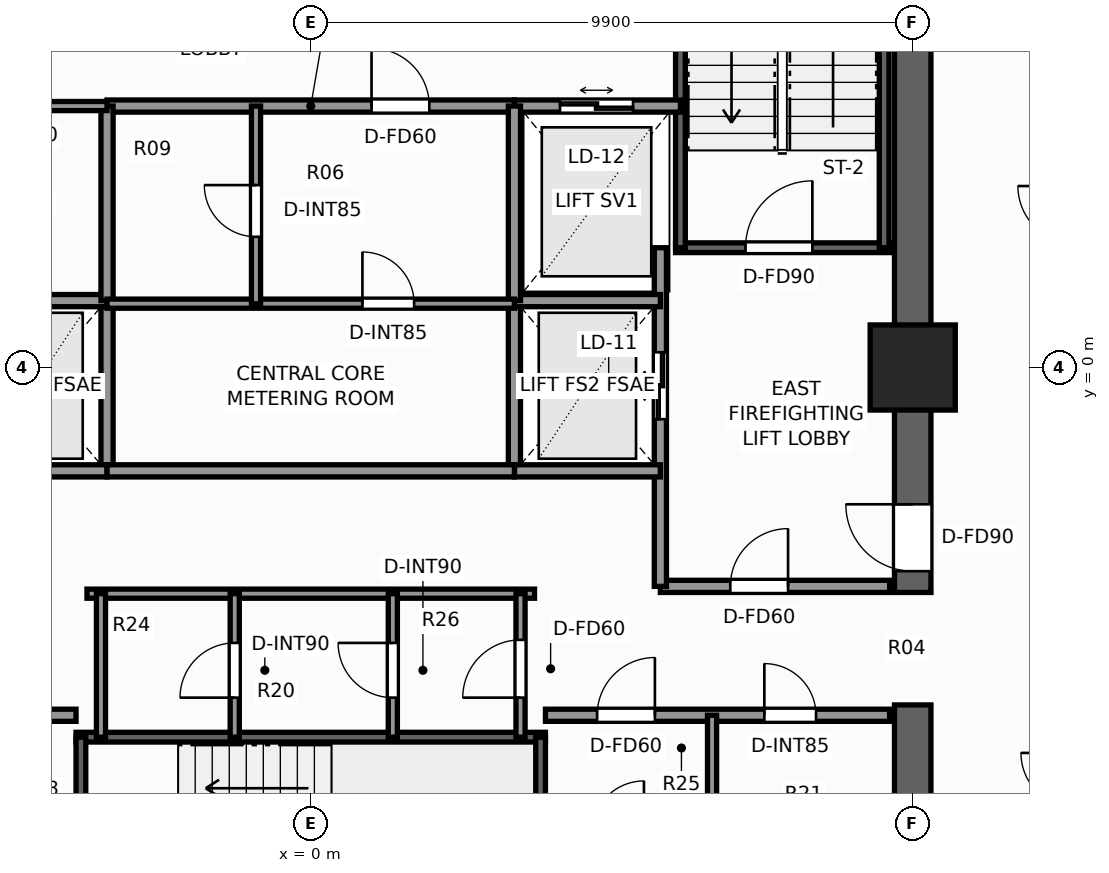
"""IFC4 building model, lengths in metres.
Left out: names, types, materials, properties, quantities, classifications, styles, units other than length and angle.
Written with IfcOpenShell. Run it as: python <this file> out.ifc"""

import sys

from ifc_helpers import new_model, si_unit, direction, frame, frame_2d, origin, origin_2d, place, context, subcontext, project, spatial, rectangle, extrude, element, fill, save


model = new_model("IFC4")
c1 = context("Model", 3, precision=1e-05, world=origin(), true_north=direction((0.0, 1.0)))
c2 = subcontext(c1, "Body", "Model", "MODEL_VIEW")
j1 = project(units=[si_unit("LENGTHUNIT", "METRE"), si_unit("PLANEANGLEUNIT", "RADIAN")], contexts=[c1])
p1 = place(None, origin())
s1 = spatial("IfcSite", under=j1, at=p1, CompositionType="ELEMENT")
p2 = place(p1, origin())
s2 = spatial("IfcBuilding", under=s1, at=p2, CompositionType="ELEMENT")
p3 = place(p2, frame((0.0, 0.0, 50.2)))
s3 = spatial("IfcBuildingStorey", under=s2, at=p3, CompositionType="ELEMENT", Elevation=50.2)
p4 = place(p3, frame((9.9, -9.6, 0.0), z_axis=(0.0, 0.0, 1.0), x_axis=(0.0, 1.0, 0.0)))
e1 = element("IfcWall", 1, at=p4, inside=s3, PredefinedType="SHEAR", context=c2, shape_type="SweptSolid", body=[
    extrude(rectangle(XDim=4.05, YDim=0.6, at=frame_2d((2.025, 0.0))), origin(), (0.0, 0.0, 1.0), 3.3),
])
p5 = place(p3, frame((9.9, -3.7, 0.0), z_axis=(0.0, 0.0, 1.0), x_axis=(0.0, 1.0, 0.0)))
e2 = element("IfcWall", 2, at=p5, inside=s3, PredefinedType="SHEAR", context=c2, shape_type="SweptSolid", body=[
    extrude(rectangle(XDim=13.3, YDim=0.6, at=frame_2d((6.65, 0.0))), origin(), (0.0, 0.0, 1.0), 3.3),
])
p6 = place(p5, frame((0.35, 0.0, 0.0)))
e3 = element("IfcOpeningElement", 3, at=p6, cuts=e2, PredefinedType="OPENING", context=c2, shape_type="SweptSolid", body=[
    extrude(rectangle(XDim=1.1, YDim=2.2, at=frame_2d((0.55, 1.1))), frame((0.0, 0.31, 0.0), z_axis=(0.0, -1.0, 0.0), x_axis=(1.0, 0.0, 0.0)), (0.0, 0.0, 1.0), 0.62),
])
p7 = place(p3, frame((9.9, 0.0, 0.0), z_axis=(0.0, 0.0, 1.0), x_axis=(1.0, 0.0, 0.0)))
e4 = element("IfcColumn", 4, at=p7, inside=s3, PredefinedType="COLUMN", context=c2, shape_type="SweptSolid", body=[
    extrude(rectangle(XDim=1.4, YDim=1.4, at=origin_2d()), origin(), (0.0, 0.0, 1.0), 3.3),
])
p8 = place(p3, frame((6.0, 1.97, 0.0), z_axis=(0.0, 0.0, 1.0), x_axis=(1.0, 0.0, 0.0)))
e5 = element("IfcWall", 5, at=p8, inside=s3, PredefinedType="SHEAR", context=c2, shape_type="SweptSolid", body=[
    extrude(rectangle(XDim=3.52, YDim=0.16, at=frame_2d((1.76, 0.0))), origin(), (0.0, 0.0, 1.0), 3.3),
])
p9 = place(p8, frame((1.15, 0.0, 0.0)))
e6 = element("IfcOpeningElement", 6, at=p9, cuts=e5, PredefinedType="OPENING", context=c2, shape_type="SweptSolid", body=[
    extrude(rectangle(XDim=1.1, YDim=2.2, at=frame_2d((0.55, 1.1))), frame((0.0, 0.09, 0.0), z_axis=(0.0, -1.0, 0.0), x_axis=(1.0, 0.0, 0.0)), (0.0, 0.0, 1.0), 0.18),
])
for number, where, z_axis, x_axis in (
    (7, (6.08, 1.97, 0.0), (0.0, 0.0, 1.0), (0.0, 1.0, 0.0)),
    (8, (9.43, 1.97, 0.0), (0.0, 0.0, 1.0), (0.0, 1.0, 0.0)),
):
    element("IfcWall", number, at=place(p3, frame(where, z_axis=z_axis, x_axis=x_axis)), inside=s3, PredefinedType="SHEAR", context=c2, shape_type="SweptSolid", body=[
        extrude(rectangle(XDim=7.56, YDim=0.16, at=frame_2d((3.78, 0.0))), origin(), (0.0, 0.0, 1.0), 3.3),
    ])
p10 = place(p3, frame((-3.86, -6.08, 0.0), z_axis=(0.0, 0.0, 1.0), x_axis=(1.0, 0.0, 0.0)))
e9 = element("IfcWall", 9, at=p10, inside=s3, PredefinedType="SHEAR", context=c2, shape_type="SweptSolid", body=[
    extrude(rectangle(XDim=7.72, YDim=0.16, at=frame_2d((3.86, 0.0))), origin(), (0.0, 0.0, 1.0), 3.3),
])
for number, where, z_axis, x_axis in (
    (10, (-3.78, -9.43, 0.0), (0.0, 0.0, 1.0), (0.0, 1.0, 0.0)),
    (11, (3.78, -9.43, 0.0), (0.0, 0.0, 1.0), (0.0, 1.0, 0.0)),
):
    element("IfcWall", number, at=place(p3, frame(where, z_axis=z_axis, x_axis=x_axis)), inside=s3, PredefinedType="SHEAR", context=c2, shape_type="SweptSolid", body=[
        extrude(rectangle(XDim=3.35, YDim=0.16, at=frame_2d((1.675, 0.0))), origin(), (0.0, 0.0, 1.0), 3.3),
    ])
p11 = place(p3, frame((-3.35, -1.7, 0.0), z_axis=(0.0, 0.0, 1.0), x_axis=(0.0, 1.0, 0.0)))
e12 = element("IfcWall", 12, at=p11, inside=s3, PredefinedType="SOLIDWALL", context=c2, shape_type="SweptSolid", body=[
    extrude(rectangle(XDim=2.8, YDim=0.2, at=frame_2d((1.4, 0.0))), origin(), (0.0, 0.0, 1.0), 3.06),
])
for number, where, z_axis, x_axis in (
    (13, (-5.75, -1.7, 0.0), (0.0, 0.0, 1.0), (1.0, 0.0, 0.0)),
    (14, (-5.75, 1.1, 0.0), (0.0, 0.0, 1.0), (1.0, 0.0, 0.0)),
):
    element("IfcWall", number, at=place(p3, frame(where, z_axis=z_axis, x_axis=x_axis)), inside=s3, PredefinedType="SOLIDWALL", context=c2, shape_type="SweptSolid", body=[
        extrude(rectangle(XDim=2.4, YDim=0.2, at=frame_2d((1.2, 0.0))), origin(), (0.0, 0.0, 1.0), 3.06),
    ])
p12 = place(p3, frame((5.75, -3.6, 0.0), z_axis=(0.0, 0.0, 1.0), x_axis=(1.0, 0.0, 0.0)))
e15 = element("IfcWall", 15, at=p12, inside=s3, PredefinedType="SOLIDWALL", context=c2, shape_type="SweptSolid", body=[
    extrude(rectangle(XDim=3.77, YDim=0.2, at=frame_2d((1.885, 0.0))), origin(), (0.0, 0.0, 1.0), 3.06),
])
p13 = place(p12, frame((1.15, 0.0, 0.0)))
e16 = element("IfcOpeningElement", 16, at=p13, cuts=e15, PredefinedType="OPENING", context=c2, shape_type="SweptSolid", body=[
    extrude(rectangle(XDim=0.95, YDim=2.06, at=frame_2d((0.475, 1.03))), frame((0.0, 0.11, 0.0), z_axis=(0.0, -1.0, 0.0), x_axis=(1.0, 0.0, 0.0)), (0.0, 0.0, 1.0), 0.22),
])
p14 = place(p3, frame((5.75, -3.6, 0.0), z_axis=(0.0, 0.0, 1.0), x_axis=(0.0, 1.0, 0.0)))
e17 = element("IfcWall", 17, at=p14, inside=s3, PredefinedType="SOLIDWALL", context=c2, shape_type="SweptSolid", body=[
    extrude(rectangle(XDim=5.57, YDim=0.2, at=frame_2d((2.785, 0.0))), origin(), (0.0, 0.0, 1.0), 3.06),
])
p15 = place(p14, frame((2.75, 0.0, 0.0)))
e18 = element("IfcOpeningElement", 18, at=p15, cuts=e17, PredefinedType="OPENING", context=c2, shape_type="SweptSolid", body=[
    extrude(rectangle(XDim=1.1, YDim=2.2, at=frame_2d((0.55, 1.1))), frame((0.0, 0.11, 0.0), z_axis=(0.0, -1.0, 0.0), x_axis=(1.0, 0.0, 0.0)), (0.0, 0.0, 1.0), 0.22),
])
p16 = place(p3, frame((3.35, -1.7, 0.0), z_axis=(0.0, 0.0, 1.0), x_axis=(0.0, 1.0, 0.0)))
e19 = element("IfcWall", 19, at=p16, inside=s3, PredefinedType="SOLIDWALL", context=c2, shape_type="SweptSolid", body=[
    extrude(rectangle(XDim=2.8, YDim=0.2, at=frame_2d((1.4, 0.0))), origin(), (0.0, 0.0, 1.0), 3.06),
])
for number, where, z_axis, x_axis in (
    (20, (3.35, -1.7, 0.0), (0.0, 0.0, 1.0), (1.0, 0.0, 0.0)),
    (21, (3.35, 1.1, 0.0), (0.0, 0.0, 1.0), (1.0, 0.0, 0.0)),
):
    element("IfcWall", number, at=place(p3, frame(where, z_axis=z_axis, x_axis=x_axis)), inside=s3, PredefinedType="SOLIDWALL", context=c2, shape_type="SweptSolid", body=[
        extrude(rectangle(XDim=2.4, YDim=0.2, at=frame_2d((1.2, 0.0))), origin(), (0.0, 0.0, 1.0), 3.06),
    ])
p17 = place(p3, frame((3.35, 4.3, 0.0), z_axis=(0.0, 0.0, 1.0), x_axis=(1.0, 0.0, 0.0)))
e22 = element("IfcWall", 22, at=p17, inside=s3, PredefinedType="SOLIDWALL", context=c2, shape_type="SweptSolid", body=[
    extrude(rectangle(XDim=2.73, YDim=0.2, at=frame_2d((1.365, 0.0))), origin(), (0.0, 0.0, 1.0), 3.06),
])
p18 = place(p17, frame((0.75, 0.0, 0.0)))
e23 = element("IfcOpeningElement", 23, at=p18, cuts=e22, PredefinedType="OPENING", context=c2, shape_type="SweptSolid", body=[
    extrude(rectangle(XDim=1.2, YDim=2.25, at=frame_2d((0.6, 1.125))), frame((0.0, 0.11, 0.0), z_axis=(0.0, -1.0, 0.0), x_axis=(1.0, 0.0, 0.0)), (0.0, 0.0, 1.0), 0.22),
])
p19 = place(p3, frame((-9.52, -5.72, 0.0), z_axis=(0.0, 0.0, 1.0), x_axis=(1.0, 0.0, 0.0)))
e24 = element("IfcWall", 24, at=p19, inside=s3, PredefinedType="SOLIDWALL", context=c2, shape_type="SweptSolid", body=[
    extrude(rectangle(XDim=5.66, YDim=0.2, at=frame_2d((2.83, 0.0))), origin(), (0.0, 0.0, 1.0), 3.06),
])
p20 = place(p19, frame((3.6, 0.0, 0.0)))
e25 = element("IfcOpeningElement", 25, at=p20, cuts=e24, PredefinedType="OPENING", context=c2, shape_type="SweptSolid", body=[
    extrude(rectangle(XDim=0.95, YDim=2.06, at=frame_2d((0.475, 1.03))), frame((0.0, 0.11, 0.0), z_axis=(0.0, -1.0, 0.0), x_axis=(1.0, 0.0, 0.0)), (0.0, 0.0, 1.0), 0.22),
])
p21 = place(p19, frame((0.85, 0.0, 0.0)))
e26 = element("IfcOpeningElement", 26, at=p21, cuts=e24, PredefinedType="OPENING", context=c2, shape_type="SweptSolid", body=[
    extrude(rectangle(XDim=0.85, YDim=2.03, at=frame_2d((0.425, 1.015))), frame((0.0, 0.11, 0.0), z_axis=(0.0, -1.0, 0.0), x_axis=(1.0, 0.0, 0.0)), (0.0, 0.0, 1.0), 0.22),
])
p22 = place(p3, frame((3.86, -5.72, 0.0), z_axis=(0.0, 0.0, 1.0), x_axis=(1.0, 0.0, 0.0)))
e27 = element("IfcWall", 27, at=p22, inside=s3, PredefinedType="SOLIDWALL", context=c2, shape_type="SweptSolid", body=[
    extrude(rectangle(XDim=5.66, YDim=0.2, at=frame_2d((2.83, 0.0))), origin(), (0.0, 0.0, 1.0), 3.06),
])
p23 = place(p22, frame((0.85, 0.0, 0.0)))
e28 = element("IfcOpeningElement", 28, at=p23, cuts=e27, PredefinedType="OPENING", context=c2, shape_type="SweptSolid", body=[
    extrude(rectangle(XDim=0.95, YDim=2.06, at=frame_2d((0.475, 1.03))), frame((0.0, 0.11, 0.0), z_axis=(0.0, -1.0, 0.0), x_axis=(1.0, 0.0, 0.0)), (0.0, 0.0, 1.0), 0.22),
])
p24 = place(p22, frame((3.6, 0.0, 0.0)))
e29 = element("IfcOpeningElement", 29, at=p24, cuts=e27, PredefinedType="OPENING", context=c2, shape_type="SweptSolid", body=[
    extrude(rectangle(XDim=0.85, YDim=2.03, at=frame_2d((0.425, 1.015))), frame((0.0, 0.11, 0.0), z_axis=(0.0, -1.0, 0.0), x_axis=(1.0, 0.0, 0.0)), (0.0, 0.0, 1.0), 0.22),
])
p25 = place(p3, frame((6.6, -7.65, 0.0), z_axis=(0.0, 0.0, 1.0), x_axis=(0.0, 1.0, 0.0)))
e30 = element("IfcWall", 30, at=p25, inside=s3, PredefinedType="PARTITIONING", context=c2, shape_type="SweptSolid", body=[
    extrude(rectangle(XDim=1.93, YDim=0.15, at=frame_2d((0.965, 0.0))), origin(), (0.0, 0.0, 1.0), 3.06),
])
p26 = place(p3, frame((-3.35, 4.3, 0.0), z_axis=(0.0, 0.0, 1.0), x_axis=(1.0, 0.0, 0.0)))
e31 = element("IfcWall", 31, at=p26, inside=s3, PredefinedType="SOLIDWALL", context=c2, shape_type="SweptSolid", body=[
    extrude(rectangle(XDim=6.7, YDim=0.2, at=frame_2d((3.35, 0.0))), origin(), (0.0, 0.0, 1.0), 3.06),
])
p27 = place(p26, frame((4.35, 0.0, 0.0)))
e32 = element("IfcOpeningElement", 32, at=p27, cuts=e31, PredefinedType="OPENING", context=c2, shape_type="SweptSolid", body=[
    extrude(rectangle(XDim=0.95, YDim=2.06, at=frame_2d((0.475, 1.03))), frame((0.0, 0.11, 0.0), z_axis=(0.0, -1.0, 0.0), x_axis=(1.0, 0.0, 0.0)), (0.0, 0.0, 1.0), 0.22),
])
p28 = place(p3, frame((-3.35, -1.7, 0.0), z_axis=(0.0, 0.0, 1.0), x_axis=(1.0, 0.0, 0.0)))
e33 = element("IfcWall", 33, at=p28, inside=s3, PredefinedType="SOLIDWALL", context=c2, shape_type="SweptSolid", body=[
    extrude(rectangle(XDim=6.7, YDim=0.2, at=frame_2d((3.35, 0.0))), origin(), (0.0, 0.0, 1.0), 3.06),
])
for number, where, z_axis, x_axis in (
    (34, (-3.35, 1.1, 0.0), (0.0, 0.0, 1.0), (0.0, 1.0, 0.0)),
    (35, (3.35, 1.1, 0.0), (0.0, 0.0, 1.0), (0.0, 1.0, 0.0)),
):
    element("IfcWall", number, at=place(p3, frame(where, z_axis=z_axis, x_axis=x_axis)), inside=s3, PredefinedType="SOLIDWALL", context=c2, shape_type="SweptSolid", body=[
        extrude(rectangle(XDim=3.2, YDim=0.2, at=frame_2d((1.6, 0.0))), origin(), (0.0, 0.0, 1.0), 3.06),
    ])
p29 = place(p3, frame((-3.35, 1.05, 0.0), z_axis=(0.0, 0.0, 1.0), x_axis=(1.0, 0.0, 0.0)))
e36 = element("IfcWall", 36, at=p29, inside=s3, PredefinedType="PARTITIONING", context=c2, shape_type="SweptSolid", body=[
    extrude(rectangle(XDim=6.7, YDim=0.15, at=frame_2d((3.35, 0.0))), origin(), (0.0, 0.0, 1.0), 3.06),
])
p30 = place(p29, frame((4.2, 0.0, 0.0)))
e37 = element("IfcOpeningElement", 37, at=p30, cuts=e36, PredefinedType="OPENING", context=c2, shape_type="SweptSolid", body=[
    extrude(rectangle(XDim=0.85, YDim=2.03, at=frame_2d((0.425, 1.015))), frame((0.0, 0.085, 0.0), z_axis=(0.0, -1.0, 0.0), x_axis=(1.0, 0.0, 0.0)), (0.0, 0.0, 1.0), 0.17),
])
p31 = place(p3, frame((-0.9, 1.05, 0.0), z_axis=(0.0, 0.0, 1.0), x_axis=(0.0, 1.0, 0.0)))
e38 = element("IfcWall", 38, at=p31, inside=s3, PredefinedType="PARTITIONING", context=c2, shape_type="SweptSolid", body=[
    extrude(rectangle(XDim=3.25, YDim=0.15, at=frame_2d((1.625, 0.0))), origin(), (0.0, 0.0, 1.0), 3.06),
])
p32 = place(p31, frame((1.1, 0.0, 0.0)))
e39 = element("IfcOpeningElement", 39, at=p32, cuts=e38, PredefinedType="OPENING", context=c2, shape_type="SweptSolid", body=[
    extrude(rectangle(XDim=0.85, YDim=2.03, at=frame_2d((0.425, 1.015))), frame((0.0, 0.085, 0.0), z_axis=(0.0, -1.0, 0.0), x_axis=(1.0, 0.0, 0.0)), (0.0, 0.0, 1.0), 0.17),
])
p33 = place(p3, frame((-3.68, -3.72, 0.0), z_axis=(0.0, 0.0, 1.0), x_axis=(1.0, 0.0, 0.0)))
e40 = element("IfcWall", 40, at=p33, inside=s3, PredefinedType="PARTITIONING", context=c2, shape_type="SweptSolid", body=[
    extrude(rectangle(XDim=7.36, YDim=0.15, at=frame_2d((3.68, 0.0))), origin(), (0.0, 0.0, 1.0), 3.06),
])
p34 = place(p3, frame((3.45, -6.08, 0.0), z_axis=(0.0, 0.0, 1.0), x_axis=(0.0, 1.0, 0.0)))
e41 = element("IfcWall", 41, at=p34, inside=s3, PredefinedType="PARTITIONING", context=c2, shape_type="SweptSolid", body=[
    extrude(rectangle(XDim=2.36, YDim=0.15, at=frame_2d((1.18, 0.0))), origin(), (0.0, 0.0, 1.0), 3.06),
])
p35 = place(p34, frame((0.65, 0.0, 0.0)))
e42 = element("IfcOpeningElement", 42, at=p35, cuts=e41, PredefinedType="OPENING", context=c2, shape_type="SweptSolid", body=[
    extrude(rectangle(XDim=0.95, YDim=2.06, at=frame_2d((0.475, 1.03))), frame((0.0, 0.085, 0.0), z_axis=(0.0, -1.0, 0.0), x_axis=(1.0, 0.0, 0.0)), (0.0, 0.0, 1.0), 0.17),
])
p36 = place(p3, frame((-3.45, -6.08, 0.0), z_axis=(0.0, 0.0, 1.0), x_axis=(0.0, 1.0, 0.0)))
e43 = element("IfcWall", 43, at=p36, inside=s3, PredefinedType="PARTITIONING", context=c2, shape_type="SweptSolid", body=[
    extrude(rectangle(XDim=2.36, YDim=0.15, at=frame_2d((1.18, 0.0))), origin(), (0.0, 0.0, 1.0), 3.06),
])
p37 = place(p3, frame((1.35, -6.08, 0.0), z_axis=(0.0, 0.0, 1.0), x_axis=(0.0, 1.0, 0.0)))
e44 = element("IfcWall", 44, at=p37, inside=s3, PredefinedType="PARTITIONING", context=c2, shape_type="SweptSolid", body=[
    extrude(rectangle(XDim=2.36, YDim=0.15, at=frame_2d((1.18, 0.0))), origin(), (0.0, 0.0, 1.0), 3.06),
])
p38 = place(p37, frame((0.65, 0.0, 0.0)))
e45 = element("IfcOpeningElement", 45, at=p38, cuts=e44, PredefinedType="OPENING", context=c2, shape_type="SweptSolid", body=[
    extrude(rectangle(XDim=0.9, YDim=2.06, at=frame_2d((0.45, 1.03))), frame((0.0, 0.085, 0.0), z_axis=(0.0, -1.0, 0.0), x_axis=(1.0, 0.0, 0.0)), (0.0, 0.0, 1.0), 0.17),
])
p39 = place(p3, frame((-1.25, -6.08, 0.0), z_axis=(0.0, 0.0, 1.0), x_axis=(0.0, 1.0, 0.0)))
e46 = element("IfcWall", 46, at=p39, inside=s3, PredefinedType="PARTITIONING", context=c2, shape_type="SweptSolid", body=[
    extrude(rectangle(XDim=2.36, YDim=0.15, at=frame_2d((1.18, 0.0))), origin(), (0.0, 0.0, 1.0), 3.06),
])
p40 = place(p39, frame((0.65, 0.0, 0.0)))
e47 = element("IfcOpeningElement", 47, at=p40, cuts=e46, PredefinedType="OPENING", context=c2, shape_type="SweptSolid", body=[
    extrude(rectangle(XDim=0.9, YDim=2.06, at=frame_2d((0.45, 1.03))), frame((0.0, 0.085, 0.0), z_axis=(0.0, -1.0, 0.0), x_axis=(1.0, 0.0, 0.0)), (0.0, 0.0, 1.0), 0.17),
])
p41 = place(p3, frame((-6.08, 4.3, 0.0), z_axis=(0.0, 0.0, 1.0), x_axis=(1.0, 0.0, 0.0)))
e48 = element("IfcWall", 48, at=p41, inside=s3, PredefinedType="PARTITIONING", context=c2, shape_type="SweptSolid", body=[
    extrude(rectangle(XDim=2.73, YDim=0.15, at=frame_2d((1.365, 0.0))), origin(), (0.0, 0.0, 1.0), 3.06),
])
p42 = place(p41, frame((0.85, 0.0, 0.0)))
e49 = element("IfcOpeningElement", 49, at=p42, cuts=e48, PredefinedType="OPENING", context=c2, shape_type="SweptSolid", body=[
    extrude(rectangle(XDim=0.95, YDim=2.06, at=frame_2d((0.475, 1.03))), frame((0.0, 0.085, 0.0), z_axis=(0.0, -1.0, 0.0), x_axis=(1.0, 0.0, 0.0)), (0.0, 0.0, 1.0), 0.17),
])
p43 = place(p9, origin())
e50 = element("IfcDoor", 50, at=p43, inside=s3, OperationType="SINGLE_SWING_RIGHT", PredefinedType="DOOR", context=c2, shape_type="SweptSolid", body=[
    extrude(rectangle(XDim=1.1, YDim=2.2, at=frame_2d((0.55, 1.1))), frame((0.0, 0.025, 0.0), z_axis=(0.0, -1.0, 0.0), x_axis=(1.0, 0.0, 0.0)), (0.0, 0.0, 1.0), 0.05),
])
fill(e6, e50)
p44 = place(p6, origin())
e51 = element("IfcDoor", 51, at=p44, inside=s3, OperationType="SINGLE_SWING_RIGHT", PredefinedType="DOOR", context=c2, shape_type="SweptSolid", body=[
    extrude(rectangle(XDim=1.1, YDim=2.2, at=frame_2d((0.55, 1.1))), frame((0.0, 0.025, 0.0), z_axis=(0.0, -1.0, 0.0), x_axis=(1.0, 0.0, 0.0)), (0.0, 0.0, 1.0), 0.05),
])
fill(e3, e51)
p45 = place(p15, origin())
e52 = element("IfcDoor", 52, at=p45, inside=s3, OperationType="DOUBLE_DOOR_SLIDING", PredefinedType="DOOR", context=c2, shape_type="SweptSolid", body=[
    extrude(rectangle(XDim=1.1, YDim=2.2, at=frame_2d((0.55, 1.1))), frame((0.0, 0.025, 0.0), z_axis=(0.0, -1.0, 0.0), x_axis=(1.0, 0.0, 0.0)), (0.0, 0.0, 1.0), 0.05),
])
fill(e18, e52)
p46 = place(p18, origin())
e53 = element("IfcDoor", 53, at=p46, inside=s3, OperationType="DOUBLE_DOOR_SLIDING", PredefinedType="DOOR", context=c2, shape_type="SweptSolid", body=[
    extrude(rectangle(XDim=1.2, YDim=2.25, at=frame_2d((0.6, 1.125))), frame((0.0, 0.025, 0.0), z_axis=(0.0, -1.0, 0.0), x_axis=(1.0, 0.0, 0.0)), (0.0, 0.0, 1.0), 0.05),
])
fill(e23, e53)
p47 = place(p23, origin())
e54 = element("IfcDoor", 54, at=p47, inside=s3, OperationType="SINGLE_SWING_RIGHT", PredefinedType="DOOR", context=c2, shape_type="SweptSolid", body=[
    extrude(rectangle(XDim=0.95, YDim=2.06, at=frame_2d((0.475, 1.03))), frame((0.0, 0.025, 0.0), z_axis=(0.0, -1.0, 0.0), x_axis=(1.0, 0.0, 0.0)), (0.0, 0.0, 1.0), 0.05),
])
fill(e28, e54)
p48 = place(p24, origin())
e55 = element("IfcDoor", 55, at=p48, inside=s3, OperationType="SINGLE_SWING_LEFT", PredefinedType="DOOR", context=c2, shape_type="SweptSolid", body=[
    extrude(rectangle(XDim=0.85, YDim=2.03, at=frame_2d((0.425, 1.015))), frame((0.0, 0.025, 0.0), z_axis=(0.0, -1.0, 0.0), x_axis=(1.0, 0.0, 0.0)), (0.0, 0.0, 1.0), 0.05),
])
fill(e29, e55)
p49 = place(p13, origin())
e56 = element("IfcDoor", 56, at=p49, inside=s3, OperationType="SINGLE_SWING_RIGHT", PredefinedType="DOOR", context=c2, shape_type="SweptSolid", body=[
    extrude(rectangle(XDim=0.95, YDim=2.06, at=frame_2d((0.475, 1.03))), frame((0.0, 0.025, 0.0), z_axis=(0.0, -1.0, 0.0), x_axis=(1.0, 0.0, 0.0)), (0.0, 0.0, 1.0), 0.05),
])
fill(e16, e56)
p50 = place(p27, origin())
e57 = element("IfcDoor", 57, at=p50, inside=s3, OperationType="SINGLE_SWING_LEFT", PredefinedType="DOOR", context=c2, shape_type="SweptSolid", body=[
    extrude(rectangle(XDim=0.95, YDim=2.06, at=frame_2d((0.475, 1.03))), frame((0.0, 0.025, 0.0), z_axis=(0.0, -1.0, 0.0), x_axis=(1.0, 0.0, 0.0)), (0.0, 0.0, 1.0), 0.05),
])
fill(e32, e57)
p51 = place(p30, origin())
e58 = element("IfcDoor", 58, at=p51, inside=s3, OperationType="SINGLE_SWING_LEFT", PredefinedType="DOOR", context=c2, shape_type="SweptSolid", body=[
    extrude(rectangle(XDim=0.85, YDim=2.03, at=frame_2d((0.425, 1.015))), frame((0.0, 0.025, 0.0), z_axis=(0.0, -1.0, 0.0), x_axis=(1.0, 0.0, 0.0)), (0.0, 0.0, 1.0), 0.05),
])
fill(e37, e58)
p52 = place(p32, origin())
e59 = element("IfcDoor", 59, at=p52, inside=s3, OperationType="SINGLE_SWING_RIGHT", PredefinedType="DOOR", context=c2, shape_type="SweptSolid", body=[
    extrude(rectangle(XDim=0.85, YDim=2.03, at=frame_2d((0.425, 1.015))), frame((0.0, 0.025, 0.0), z_axis=(0.0, -1.0, 0.0), x_axis=(1.0, 0.0, 0.0)), (0.0, 0.0, 1.0), 0.05),
])
fill(e39, e59)
p53 = place(p35, origin())
e60 = element("IfcDoor", 60, at=p53, inside=s3, OperationType="SINGLE_SWING_LEFT", PredefinedType="DOOR", context=c2, shape_type="SweptSolid", body=[
    extrude(rectangle(XDim=0.95, YDim=2.06, at=frame_2d((0.475, 1.03))), frame((0.0, 0.025, 0.0), z_axis=(0.0, -1.0, 0.0), x_axis=(1.0, 0.0, 0.0)), (0.0, 0.0, 1.0), 0.05),
])
fill(e42, e60)
p54 = place(p38, origin())
e61 = element("IfcDoor", 61, at=p54, inside=s3, OperationType="SINGLE_SWING_RIGHT", PredefinedType="DOOR", context=c2, shape_type="SweptSolid", body=[
    extrude(rectangle(XDim=0.9, YDim=2.06, at=frame_2d((0.45, 1.03))), frame((0.0, 0.025, 0.0), z_axis=(0.0, -1.0, 0.0), x_axis=(1.0, 0.0, 0.0)), (0.0, 0.0, 1.0), 0.05),
])
fill(e45, e61)
p55 = place(p40, origin())
e62 = element("IfcDoor", 62, at=p55, inside=s3, OperationType="SINGLE_SWING_LEFT", PredefinedType="DOOR", context=c2, shape_type="SweptSolid", body=[
    extrude(rectangle(XDim=0.9, YDim=2.06, at=frame_2d((0.45, 1.03))), frame((0.0, 0.025, 0.0), z_axis=(0.0, -1.0, 0.0), x_axis=(1.0, 0.0, 0.0)), (0.0, 0.0, 1.0), 0.05),
])
fill(e47, e62)
save(model, sys.argv[1])
